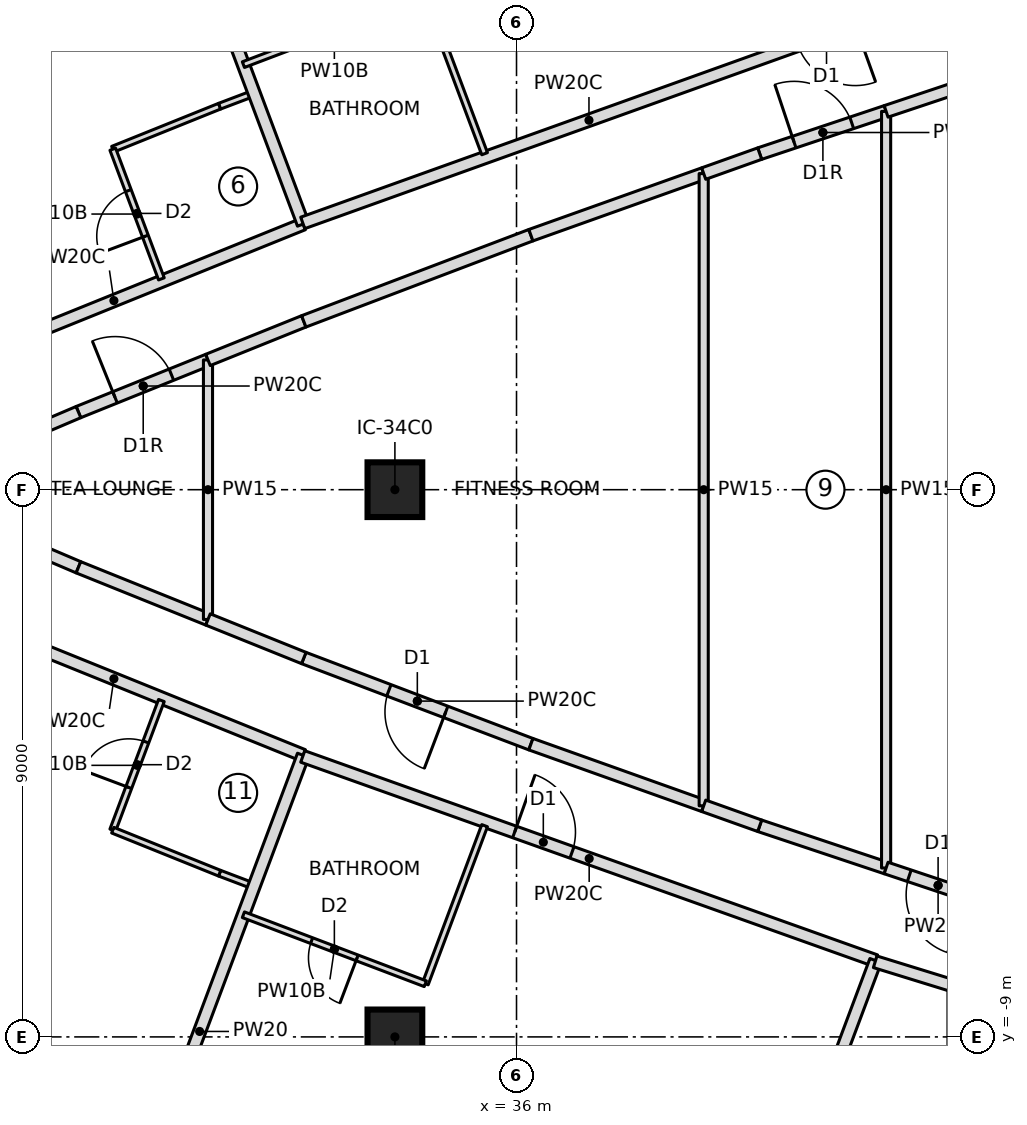
"""IFC4 building model, lengths in metres.
Left out: names, types, materials, properties, quantities, classifications, styles, units other than length and angle.
Written with IfcOpenShell. Run it as: python <this file> out.ifc"""

import sys

from ifc_helpers import new_model, si_unit, direction, frame, frame_2d, origin, origin_2d, place, context, subcontext, project, spatial, rectangle, extrude, element, fill, save


model = new_model("IFC4")
c1 = context("Model", 3, precision=1e-05, world=origin(), true_north=direction((0.0, 1.0)))
c2 = subcontext(c1, "Body", "Model", "MODEL_VIEW")
j1 = project(units=[si_unit("LENGTHUNIT", "METRE"), si_unit("PLANEANGLEUNIT", "RADIAN")], contexts=[c1])
p1 = place(None, origin())
s1 = spatial("IfcSite", under=j1, at=p1, CompositionType="ELEMENT")
p2 = place(p1, origin())
s2 = spatial("IfcBuilding", under=s1, at=p2, CompositionType="ELEMENT")
p3 = place(p2, frame((0.0, 0.0, 227.9)))
s3 = spatial("IfcBuildingStorey", under=s2, at=p3, CompositionType="ELEMENT", Elevation=227.9)
for number, where, z_axis, x_axis in (
    (1, (34.0, -9.0, 0.0), (0.0, 0.0, 1.0), (1.0, 0.0, 0.0)),
    (2, (34.0, 0.0, 0.0), (0.0, 0.0, 1.0), (1.0, 0.0, 0.0)),
):
    element("IfcColumn", number, at=place(p3, frame(where, z_axis=z_axis, x_axis=x_axis)), inside=s3, PredefinedType="COLUMN", context=c2, shape_type="SweptSolid", body=[
        extrude(rectangle(XDim=0.9, YDim=0.9, at=origin_2d()), origin(), (0.0, 0.0, 1.0), 3.55),
    ])
p4 = place(p3, frame((26.266, 1.85, 0.0), z_axis=(0.0, 0.0, 1.0), x_axis=(0.927007906702, 0.375041785555, 0.0)))
e3 = element("IfcWall", 3, at=p4, inside=s3, PredefinedType="PARTITIONING", context=c2, shape_type="SweptSolid", body=[
    extrude(rectangle(XDim=6.716, YDim=0.2, at=frame_2d((3.358, 0.0))), origin(), (0.0, 0.0, 1.0), 3.25),
])
p5 = place(p4, frame((0.35, 0.0, 0.0)))
e4 = element("IfcOpeningElement", 4, at=p5, cuts=e3, PredefinedType="OPENING", context=c2, shape_type="SweptSolid", body=[
    extrude(rectangle(XDim=1.0, YDim=2.1, at=frame_2d((0.5, 1.05))), frame((0.0, 0.11, 0.0), z_axis=(0.0, -1.0, 0.0), x_axis=(1.0, 0.0, 0.0)), (0.0, 0.0, 1.0), 0.22),
])
p6 = place(p3, frame((29.36, 5.6, 0.0), z_axis=(0.0, 0.0, 1.0), x_axis=(0.927594225674, 0.373589283166, 0.0)))
e5 = element("IfcWall", 5, at=p6, inside=s3, PredefinedType="PARTITIONING", context=c2, shape_type="SweptSolid", body=[
    extrude(rectangle(XDim=1.895, YDim=0.1, at=frame_2d((0.947, 0.0))), origin(), (0.0, 0.0, 1.0), 3.25),
])
p7 = place(p3, frame((31.117, 6.308, 0.0), z_axis=(0.0, 0.0, 1.0), x_axis=(0.935048188903, 0.354520640342, 0.0)))
e6 = element("IfcWall", 6, at=p7, inside=s3, PredefinedType="PARTITIONING", context=c2, shape_type="SweptSolid", body=[
    extrude(rectangle(XDim=0.606, YDim=0.1, at=frame_2d((0.303, 0.0))), origin(), (0.0, 0.0, 1.0), 3.25),
])
p8 = place(p3, frame((30.16, 3.467, 0.0), z_axis=(0.0, 0.0, 1.0), x_axis=(-0.351158682313, 0.936315961541, 0.0)))
e7 = element("IfcWall", 7, at=p8, inside=s3, PredefinedType="PARTITIONING", context=c2, shape_type="SweptSolid", body=[
    extrude(rectangle(XDim=2.278, YDim=0.1, at=frame_2d((1.139, 0.0))), origin(), (0.0, 0.0, 1.0), 3.25),
])
p9 = place(p8, frame((0.75, 0.0, 0.0)))
e8 = element("IfcOpeningElement", 8, at=p9, cuts=e7, PredefinedType="OPENING", context=c2, shape_type="SweptSolid", body=[
    extrude(rectangle(XDim=0.8, YDim=2.1, at=frame_2d((0.4, 1.05))), frame((0.0, 0.06, 0.0), z_axis=(0.0, -1.0, 0.0), x_axis=(1.0, 0.0, 0.0)), (0.0, 0.0, 1.0), 0.12),
])
p10 = place(p3, frame((32.492, 4.369, 0.0), z_axis=(0.0, 0.0, 1.0), x_axis=(-0.351128958016, 0.93632710889, 0.0)))
e9 = element("IfcWall", 9, at=p10, inside=s3, PredefinedType="PARTITIONING", context=c2, shape_type="SweptSolid", body=[
    extrude(rectangle(XDim=9.7, YDim=0.2, at=frame_2d((4.85, 0.0))), origin(), (0.0, 0.0, 1.0), 3.25),
])
p11 = place(p3, frame((41.898, 7.764, 0.0), z_axis=(0.0, 0.0, 1.0), x_axis=(-0.941277643829, -0.337633525034, 0.0)))
e10 = element("IfcWall", 10, at=p11, inside=s3, PredefinedType="PARTITIONING", context=c2, shape_type="SweptSolid", body=[
    extrude(rectangle(XDim=10.001, YDim=0.2, at=frame_2d((5.0, 0.0))), origin(), (0.0, 0.0, 1.0), 3.25),
])
p12 = place(p11, frame((0.35, 0.0, 0.0)))
e11 = element("IfcOpeningElement", 11, at=p12, cuts=e10, PredefinedType="OPENING", context=c2, shape_type="SweptSolid", body=[
    extrude(rectangle(XDim=1.0, YDim=2.1, at=frame_2d((0.5, 1.05))), frame((0.0, 0.11, 0.0), z_axis=(0.0, -1.0, 0.0), x_axis=(1.0, 0.0, 0.0)), (0.0, 0.0, 1.0), 0.22),
])
p13 = place(p3, frame((31.509, 6.991, 0.0), z_axis=(0.0, 0.0, 1.0), x_axis=(0.934948661714, 0.354783032232, 0.0)))
e12 = element("IfcWall", 12, at=p13, inside=s3, PredefinedType="PARTITIONING", context=c2, shape_type="SweptSolid", body=[
    extrude(rectangle(XDim=3.2, YDim=0.1, at=frame_2d((1.6, 0.0))), origin(), (0.0, 0.0, 1.0), 3.25),
])
p14 = place(p13, frame((1.2, 0.0, 0.0)))
e13 = element("IfcOpeningElement", 13, at=p14, cuts=e12, PredefinedType="OPENING", context=c2, shape_type="SweptSolid", body=[
    extrude(rectangle(XDim=0.8, YDim=2.1, at=frame_2d((0.4, 1.05))), frame((0.0, 0.06, 0.0), z_axis=(0.0, -1.0, 0.0), x_axis=(1.0, 0.0, 0.0)), (0.0, 0.0, 1.0), 0.12),
])
p15 = place(p3, frame((34.5, 8.126, 0.0), z_axis=(0.0, 0.0, 1.0), x_axis=(0.351065630332, -0.936350854755, 0.0)))
e14 = element("IfcWall", 14, at=p15, inside=s3, PredefinedType="PARTITIONING", context=c2, shape_type="SweptSolid", body=[
    extrude(rectangle(XDim=2.777, YDim=0.1, at=frame_2d((1.388, 0.0))), origin(), (0.0, 0.0, 1.0), 3.25),
])
p16 = place(p3, frame((26.266, -1.85, 0.0), z_axis=(0.0, 0.0, 1.0), x_axis=(0.927007906702, -0.375041785555, 0.0)))
e15 = element("IfcWall", 15, at=p16, inside=s3, PredefinedType="PARTITIONING", context=c2, shape_type="SweptSolid", body=[
    extrude(rectangle(XDim=6.716, YDim=0.2, at=frame_2d((3.358, 0.0))), origin(), (0.0, 0.0, 1.0), 3.25),
])
p17 = place(p16, frame((0.35, 0.0, 0.0)))
e16 = element("IfcOpeningElement", 16, at=p17, cuts=e15, PredefinedType="OPENING", context=c2, shape_type="SweptSolid", body=[
    extrude(rectangle(XDim=1.0, YDim=2.1, at=frame_2d((0.5, 1.05))), frame((0.0, 0.11, 0.0), z_axis=(0.0, -1.0, 0.0), x_axis=(1.0, 0.0, 0.0)), (0.0, 0.0, 1.0), 0.22),
])
p18 = place(p3, frame((29.36, -5.6, 0.0), z_axis=(0.0, 0.0, 1.0), x_axis=(0.351158682313, 0.936315961541, 0.0)))
e17 = element("IfcWall", 17, at=p18, inside=s3, PredefinedType="PARTITIONING", context=c2, shape_type="SweptSolid", body=[
    extrude(rectangle(XDim=2.278, YDim=0.1, at=frame_2d((1.139, 0.0))), origin(), (0.0, 0.0, 1.0), 3.25),
])
p19 = place(p18, frame((0.75, 0.0, 0.0)))
e18 = element("IfcOpeningElement", 18, at=p19, cuts=e17, PredefinedType="OPENING", context=c2, shape_type="SweptSolid", body=[
    extrude(rectangle(XDim=0.8, YDim=2.1, at=frame_2d((0.4, 1.05))), frame((0.0, 0.06, 0.0), z_axis=(0.0, -1.0, 0.0), x_axis=(1.0, 0.0, 0.0)), (0.0, 0.0, 1.0), 0.12),
])
p20 = place(p3, frame((31.684, -6.522, 0.0), z_axis=(0.0, 0.0, 1.0), x_axis=(-0.935048188903, 0.354520640342, 0.0)))
e19 = element("IfcWall", 19, at=p20, inside=s3, PredefinedType="PARTITIONING", context=c2, shape_type="SweptSolid", body=[
    extrude(rectangle(XDim=0.606, YDim=0.1, at=frame_2d((0.303, 0.0))), origin(), (0.0, 0.0, 1.0), 3.25),
])
p21 = place(p3, frame((31.117, -6.308, 0.0), z_axis=(0.0, 0.0, 1.0), x_axis=(-0.927594225674, 0.373589283166, 0.0)))
e20 = element("IfcWall", 20, at=p21, inside=s3, PredefinedType="PARTITIONING", context=c2, shape_type="SweptSolid", body=[
    extrude(rectangle(XDim=1.895, YDim=0.1, at=frame_2d((0.947, 0.0))), origin(), (0.0, 0.0, 1.0), 3.25),
])
p22 = place(p3, frame((29.086, -13.451, 0.0), z_axis=(0.0, 0.0, 1.0), x_axis=(0.351128958016, 0.93632710889, 0.0)))
e21 = element("IfcWall", 21, at=p22, inside=s3, PredefinedType="PARTITIONING", context=c2, shape_type="SweptSolid", body=[
    extrude(rectangle(XDim=9.7, YDim=0.2, at=frame_2d((4.85, 0.0))), origin(), (0.0, 0.0, 1.0), 3.25),
])
p23 = place(p3, frame((32.485, -4.388, 0.0), z_axis=(0.0, 0.0, 1.0), x_axis=(0.941953797829, -0.335742524498, 0.0)))
e22 = element("IfcWall", 22, at=p23, inside=s3, PredefinedType="PARTITIONING", context=c2, shape_type="SweptSolid", body=[
    extrude(rectangle(XDim=10.001, YDim=0.2, at=frame_2d((5.001, 0.0))), origin(), (0.0, 0.0, 1.0), 3.25),
])
p24 = place(p23, frame((3.7, 0.0, 0.0)))
e23 = element("IfcOpeningElement", 23, at=p24, cuts=e22, PredefinedType="OPENING", context=c2, shape_type="SweptSolid", body=[
    extrude(rectangle(XDim=1.0, YDim=2.1, at=frame_2d((0.5, 1.05))), frame((0.0, 0.11, 0.0), z_axis=(0.0, -1.0, 0.0), x_axis=(1.0, 0.0, 0.0)), (0.0, 0.0, 1.0), 0.22),
])
p25 = place(p3, frame((35.475, -5.526, 0.0), z_axis=(0.0, 0.0, 1.0), x_axis=(-0.351065630332, -0.936350854755, 0.0)))
e24 = element("IfcWall", 24, at=p25, inside=s3, PredefinedType="PARTITIONING", context=c2, shape_type="SweptSolid", body=[
    extrude(rectangle(XDim=2.777, YDim=0.1, at=frame_2d((1.388, 0.0))), origin(), (0.0, 0.0, 1.0), 3.25),
])
p26 = place(p3, frame((34.5, -8.126, 0.0), z_axis=(0.0, 0.0, 1.0), x_axis=(-0.934948661714, 0.354783032232, 0.0)))
e25 = element("IfcWall", 25, at=p26, inside=s3, PredefinedType="PARTITIONING", context=c2, shape_type="SweptSolid", body=[
    extrude(rectangle(XDim=3.2, YDim=0.1, at=frame_2d((1.6, 0.0))), origin(), (0.0, 0.0, 1.0), 3.25),
])
p27 = place(p26, frame((1.2, 0.0, 0.0)))
e26 = element("IfcOpeningElement", 26, at=p27, cuts=e25, PredefinedType="OPENING", context=c2, shape_type="SweptSolid", body=[
    extrude(rectangle(XDim=0.8, YDim=2.1, at=frame_2d((0.4, 1.05))), frame((0.0, 0.06, 0.0), z_axis=(0.0, -1.0, 0.0), x_axis=(1.0, 0.0, 0.0)), (0.0, 0.0, 1.0), 0.12),
])
p28 = place(p3, frame((38.497, -16.834, 0.0), z_axis=(0.0, 0.0, 1.0), x_axis=(0.35112895446, 0.936327110224, 0.0)))
e27 = element("IfcWall", 27, at=p28, inside=s3, PredefinedType="PARTITIONING", context=c2, shape_type="SweptSolid", body=[
    extrude(rectangle(XDim=9.706, YDim=0.2, at=frame_2d((4.853, 0.0))), origin(), (0.0, 0.0, 1.0), 3.25),
])
p29 = place(p3, frame((28.796, 1.276, 0.0), z_axis=(0.0, 0.0, 1.0), x_axis=(0.927609077038, 0.373552406224, 0.0)))
e28 = element("IfcWall", 28, at=p29, inside=s3, PredefinedType="PARTITIONING", context=c2, shape_type="SweptSolid", body=[
    extrude(rectangle(XDim=2.297, YDim=0.2, at=frame_2d((1.148, 0.0))), origin(), (0.0, 0.0, 1.0), 3.25),
])
p30 = place(p29, frame((0.648, 0.0, 0.0)))
e29 = element("IfcOpeningElement", 29, at=p30, cuts=e28, PredefinedType="OPENING", context=c2, shape_type="SweptSolid", body=[
    extrude(rectangle(XDim=1.0, YDim=2.1, at=frame_2d((0.5, 1.05))), frame((0.0, 0.11, 0.0), z_axis=(0.0, -1.0, 0.0), x_axis=(1.0, 0.0, 0.0)), (0.0, 0.0, 1.0), 0.22),
])
for number, where, z_axis, x_axis in (
    (30, (28.796, -1.276, 0.0), (0.0, 0.0, 1.0), (-0.92, 0.392, 0.0)),
    (31, (26.85, 0.447, 0.0), (0.0, 0.0, 1.0), (0.92, 0.392, 0.0)),
):
    element("IfcWall", number, at=place(p3, frame(where, z_axis=z_axis, x_axis=x_axis)), inside=s3, PredefinedType="PARTITIONING", context=c2, shape_type="SweptSolid", body=[
        extrude(rectangle(XDim=2.115, YDim=0.2, at=frame_2d((1.058, 0.0))), origin(), (0.0, 0.0, 1.0), 3.25),
    ])
p31 = place(p3, frame((30.926, -2.134, 0.0), z_axis=(0.0, 0.0, 1.0), x_axis=(-0.927609077038, 0.373552406224, 0.0)))
e32 = element("IfcWall", 32, at=p31, inside=s3, PredefinedType="PARTITIONING", context=c2, shape_type="SweptSolid", body=[
    extrude(rectangle(XDim=2.297, YDim=0.2, at=frame_2d((1.148, 0.0))), origin(), (0.0, 0.0, 1.0), 3.25),
])
p32 = place(p3, frame((30.926, -2.134, 0.0), z_axis=(0.0, 0.0, 1.0), x_axis=(0.0, 1.0, 0.0)))
e33 = element("IfcWall", 33, at=p32, inside=s3, PredefinedType="PARTITIONING", context=c2, shape_type="SweptSolid", body=[
    extrude(rectangle(XDim=4.268, YDim=0.15, at=frame_2d((2.134, 0.0))), origin(), (0.0, 0.0, 1.0), 3.25),
])
p33 = place(p3, frame((36.236, -4.186, 0.0), z_axis=(0.0, 0.0, 1.0), x_axis=(-0.934950696546, 0.354777669856, 0.0)))
e34 = element("IfcWall", 34, at=p33, inside=s3, PredefinedType="PARTITIONING", context=c2, shape_type="SweptSolid", body=[
    extrude(rectangle(XDim=3.995, YDim=0.2, at=frame_2d((1.997, 0.0))), origin(), (0.0, 0.0, 1.0), 3.25),
])
p34 = place(p33, frame((1.498, 0.0, 0.0)))
e35 = element("IfcOpeningElement", 35, at=p34, cuts=e34, PredefinedType="OPENING", context=c2, shape_type="SweptSolid", body=[
    extrude(rectangle(XDim=1.0, YDim=2.1, at=frame_2d((0.5, 1.05))), frame((0.0, 0.11, 0.0), z_axis=(0.0, -1.0, 0.0), x_axis=(1.0, 0.0, 0.0)), (0.0, 0.0, 1.0), 0.22),
])
p35 = place(p3, frame((39.078, -5.199, 0.0), z_axis=(0.0, 0.0, 1.0), x_axis=(-0.941908381697, 0.335869916023, 0.0)))
e36 = element("IfcWall", 36, at=p35, inside=s3, PredefinedType="PARTITIONING", context=c2, shape_type="SweptSolid", body=[
    extrude(rectangle(XDim=3.017, YDim=0.2, at=frame_2d((1.509, 0.0))), origin(), (0.0, 0.0, 1.0), 3.25),
])
for number, where, z_axis, x_axis in (
    (37, (32.501, -2.768, 0.0), (0.0, 0.0, 1.0), (-0.928, 0.373, 0.0)),
    (38, (30.926, 2.134, 0.0), (0.0, 0.0, 1.0), (0.928, 0.373, 0.0)),
):
    element("IfcWall", number, at=place(p3, frame(where, z_axis=z_axis, x_axis=x_axis)), inside=s3, PredefinedType="PARTITIONING", context=c2, shape_type="SweptSolid", body=[
        extrude(rectangle(XDim=1.698, YDim=0.2, at=frame_2d((0.849, 0.0))), origin(), (0.0, 0.0, 1.0), 3.25),
    ])
p36 = place(p3, frame((32.501, 2.768, 0.0), z_axis=(0.0, 0.0, 1.0), x_axis=(0.934950696546, 0.354777669856, 0.0)))
e39 = element("IfcWall", 39, at=p36, inside=s3, PredefinedType="PARTITIONING", context=c2, shape_type="SweptSolid", body=[
    extrude(rectangle(XDim=3.995, YDim=0.2, at=frame_2d((1.997, 0.0))), origin(), (0.0, 0.0, 1.0), 3.25),
])
p37 = place(p3, frame((36.236, 4.186, 0.0), z_axis=(0.0, 0.0, 1.0), x_axis=(0.941908381697, 0.335869916023, 0.0)))
e40 = element("IfcWall", 40, at=p37, inside=s3, PredefinedType="PARTITIONING", context=c2, shape_type="SweptSolid", body=[
    extrude(rectangle(XDim=3.017, YDim=0.2, at=frame_2d((1.509, 0.0))), origin(), (0.0, 0.0, 1.0), 3.25),
])
p38 = place(p3, frame((39.078, -5.199, 0.0), z_axis=(0.0, 0.0, 1.0), x_axis=(0.0, 1.0, 0.0)))
e41 = element("IfcWall", 41, at=p38, inside=s3, PredefinedType="PARTITIONING", context=c2, shape_type="SweptSolid", body=[
    extrude(rectangle(XDim=10.398, YDim=0.15, at=frame_2d((5.199, 0.0))), origin(), (0.0, 0.0, 1.0), 3.25),
])
p39 = place(p3, frame((39.999, 5.527, 0.0), z_axis=(0.0, 0.0, 1.0), x_axis=(0.9484714727, 0.316862534034, 0.0)))
e42 = element("IfcWall", 42, at=p39, inside=s3, PredefinedType="PARTITIONING", context=c2, shape_type="SweptSolid", body=[
    extrude(rectangle(XDim=2.192, YDim=0.2, at=frame_2d((1.096, 0.0))), origin(), (0.0, 0.0, 1.0), 3.25),
])
p40 = place(p39, frame((0.596, 0.0, 0.0)))
e43 = element("IfcOpeningElement", 43, at=p40, cuts=e42, PredefinedType="OPENING", context=c2, shape_type="SweptSolid", body=[
    extrude(rectangle(XDim=1.0, YDim=2.1, at=frame_2d((0.5, 1.05))), frame((0.0, 0.11, 0.0), z_axis=(0.0, -1.0, 0.0), x_axis=(1.0, 0.0, 0.0)), (0.0, 0.0, 1.0), 0.22),
])
p41 = place(p3, frame((42.078, -6.222, 0.0), z_axis=(0.0, 0.0, 1.0), x_axis=(-0.9484714727, 0.316862534034, 0.0)))
e44 = element("IfcWall", 44, at=p41, inside=s3, PredefinedType="PARTITIONING", context=c2, shape_type="SweptSolid", body=[
    extrude(rectangle(XDim=2.192, YDim=0.2, at=frame_2d((1.096, 0.0))), origin(), (0.0, 0.0, 1.0), 3.25),
])
for number, where, z_axis, x_axis in (
    (45, (39.999, -5.527, 0.0), (0.0, 0.0, 1.0), (-0.942, 0.336, 0.0)),
    (46, (39.078, 5.199, 0.0), (0.0, 0.0, 1.0), (0.942, 0.336, 0.0)),
):
    element("IfcWall", number, at=place(p3, frame(where, z_axis=z_axis, x_axis=x_axis)), inside=s3, PredefinedType="PARTITIONING", context=c2, shape_type="SweptSolid", body=[
        extrude(rectangle(XDim=0.978, YDim=0.2, at=frame_2d((0.489, 0.0))), origin(), (0.0, 0.0, 1.0), 3.25),
    ])
p42 = place(p3, frame((42.078, -6.222, 0.0), z_axis=(0.0, 0.0, 1.0), x_axis=(0.0, 1.0, 0.0)))
e47 = element("IfcWall", 47, at=p42, inside=s3, PredefinedType="PARTITIONING", context=c2, shape_type="SweptSolid", body=[
    extrude(rectangle(XDim=12.444, YDim=0.15, at=frame_2d((6.222, 0.0))), origin(), (0.0, 0.0, 1.0), 3.25),
])
p43 = place(p3, frame((43.788, -6.793, 0.0), z_axis=(0.0, 0.0, 1.0), x_axis=(-0.948466406859, 0.316877697323, 0.0)))
e48 = element("IfcWall", 48, at=p43, inside=s3, PredefinedType="PARTITIONING", context=c2, shape_type="SweptSolid", body=[
    extrude(rectangle(XDim=1.803, YDim=0.2, at=frame_2d((0.901, 0.0))), origin(), (0.0, 0.0, 1.0), 3.25),
])
p44 = place(p43, frame((0.402, 0.0, 0.0)))
e49 = element("IfcOpeningElement", 49, at=p44, cuts=e48, PredefinedType="OPENING", context=c2, shape_type="SweptSolid", body=[
    extrude(rectangle(XDim=1.0, YDim=2.1, at=frame_2d((0.5, 1.05))), frame((0.0, 0.11, 0.0), z_axis=(0.0, -1.0, 0.0), x_axis=(1.0, 0.0, 0.0)), (0.0, 0.0, 1.0), 0.22),
])
p45 = place(p3, frame((42.078, 6.222, 0.0), z_axis=(0.0, 0.0, 1.0), x_axis=(0.948466406859, 0.316877697323, 0.0)))
e50 = element("IfcWall", 50, at=p45, inside=s3, PredefinedType="PARTITIONING", context=c2, shape_type="SweptSolid", body=[
    extrude(rectangle(XDim=1.803, YDim=0.2, at=frame_2d((0.901, 0.0))), origin(), (0.0, 0.0, 1.0), 3.25),
])
p46 = place(p3, frame((41.898, -7.764, 0.0), z_axis=(0.0, 0.0, 1.0), x_axis=(0.955502033518, -0.294984514752, 0.0)))
e51 = element("IfcWall", 51, at=p46, inside=s3, PredefinedType="PARTITIONING", context=c2, shape_type="SweptSolid", body=[
    extrude(rectangle(XDim=6.7, YDim=0.2, at=frame_2d((3.35, 0.0))), origin(), (0.0, 0.0, 1.0), 3.25),
])
p47 = place(p46, frame((3.95, 0.0, 0.0)))
e52 = element("IfcOpeningElement", 52, at=p47, cuts=e51, PredefinedType="OPENING", context=c2, shape_type="SweptSolid", body=[
    extrude(rectangle(XDim=1.5, YDim=2.1, at=frame_2d((0.75, 1.05))), frame((0.0, 0.11, 0.0), z_axis=(0.0, -1.0, 0.0), x_axis=(1.0, 0.0, 0.0)), (0.0, 0.0, 1.0), 0.22),
])
p48 = place(p9, origin())
e53 = element("IfcDoor", 53, at=p48, inside=s3, OperationType="SINGLE_SWING_LEFT", PredefinedType="DOOR", context=c2, shape_type="SweptSolid", body=[
    extrude(rectangle(XDim=0.8, YDim=2.1, at=frame_2d((0.4, 1.05))), frame((0.0, 0.025, 0.0), z_axis=(0.0, -1.0, 0.0), x_axis=(1.0, 0.0, 0.0)), (0.0, 0.0, 1.0), 0.05),
])
fill(e8, e53)
p49 = place(p19, origin())
e54 = element("IfcDoor", 54, at=p49, inside=s3, OperationType="SINGLE_SWING_LEFT", PredefinedType="DOOR", context=c2, shape_type="SweptSolid", body=[
    extrude(rectangle(XDim=0.8, YDim=2.1, at=frame_2d((0.4, 1.05))), frame((0.0, 0.025, 0.0), z_axis=(0.0, -1.0, 0.0), x_axis=(1.0, 0.0, 0.0)), (0.0, 0.0, 1.0), 0.05),
])
fill(e18, e54)
p50 = place(p27, origin())
e55 = element("IfcDoor", 55, at=p50, inside=s3, OperationType="SINGLE_SWING_LEFT", PredefinedType="DOOR", context=c2, shape_type="SweptSolid", body=[
    extrude(rectangle(XDim=0.8, YDim=2.1, at=frame_2d((0.4, 1.05))), frame((0.0, 0.025, 0.0), z_axis=(0.0, -1.0, 0.0), x_axis=(1.0, 0.0, 0.0)), (0.0, 0.0, 1.0), 0.05),
])
fill(e26, e55)
p51 = place(p24, origin())
e56 = element("IfcDoor", 56, at=p51, inside=s3, OperationType="SINGLE_SWING_LEFT", PredefinedType="DOOR", context=c2, shape_type="SweptSolid", body=[
    extrude(rectangle(XDim=1.0, YDim=2.1, at=frame_2d((0.5, 1.05))), frame((0.0, 0.025, 0.0), z_axis=(0.0, -1.0, 0.0), x_axis=(1.0, 0.0, 0.0)), (0.0, 0.0, 1.0), 0.05),
])
fill(e23, e56)
p52 = place(p30, origin())
e57 = element("IfcDoor", 57, at=p52, inside=s3, OperationType="SINGLE_SWING_RIGHT", PredefinedType="DOOR", context=c2, shape_type="SweptSolid", body=[
    extrude(rectangle(XDim=1.0, YDim=2.1, at=frame_2d((0.5, 1.05))), frame((0.0, 0.025, 0.0), z_axis=(0.0, -1.0, 0.0), x_axis=(1.0, 0.0, 0.0)), (0.0, 0.0, 1.0), 0.05),
])
fill(e29, e57)
p53 = place(p34, origin())
e58 = element("IfcDoor", 58, at=p53, inside=s3, OperationType="SINGLE_SWING_LEFT", PredefinedType="DOOR", context=c2, shape_type="SweptSolid", body=[
    extrude(rectangle(XDim=1.0, YDim=2.1, at=frame_2d((0.5, 1.05))), frame((0.0, 0.025, 0.0), z_axis=(0.0, -1.0, 0.0), x_axis=(1.0, 0.0, 0.0)), (0.0, 0.0, 1.0), 0.05),
])
fill(e35, e58)
p54 = place(p40, origin())
e59 = element("IfcDoor", 59, at=p54, inside=s3, OperationType="SINGLE_SWING_RIGHT", PredefinedType="DOOR", context=c2, shape_type="SweptSolid", body=[
    extrude(rectangle(XDim=1.0, YDim=2.1, at=frame_2d((0.5, 1.05))), frame((0.0, 0.025, 0.0), z_axis=(0.0, -1.0, 0.0), x_axis=(1.0, 0.0, 0.0)), (0.0, 0.0, 1.0), 0.05),
])
fill(e43, e59)
p55 = place(p44, origin())
e60 = element("IfcDoor", 60, at=p55, inside=s3, OperationType="SINGLE_SWING_LEFT", PredefinedType="DOOR", context=c2, shape_type="SweptSolid", body=[
    extrude(rectangle(XDim=1.0, YDim=2.1, at=frame_2d((0.5, 1.05))), frame((0.0, 0.025, 0.0), z_axis=(0.0, -1.0, 0.0), x_axis=(1.0, 0.0, 0.0)), (0.0, 0.0, 1.0), 0.05),
])
fill(e49, e60)
save(model, sys.argv[1])
